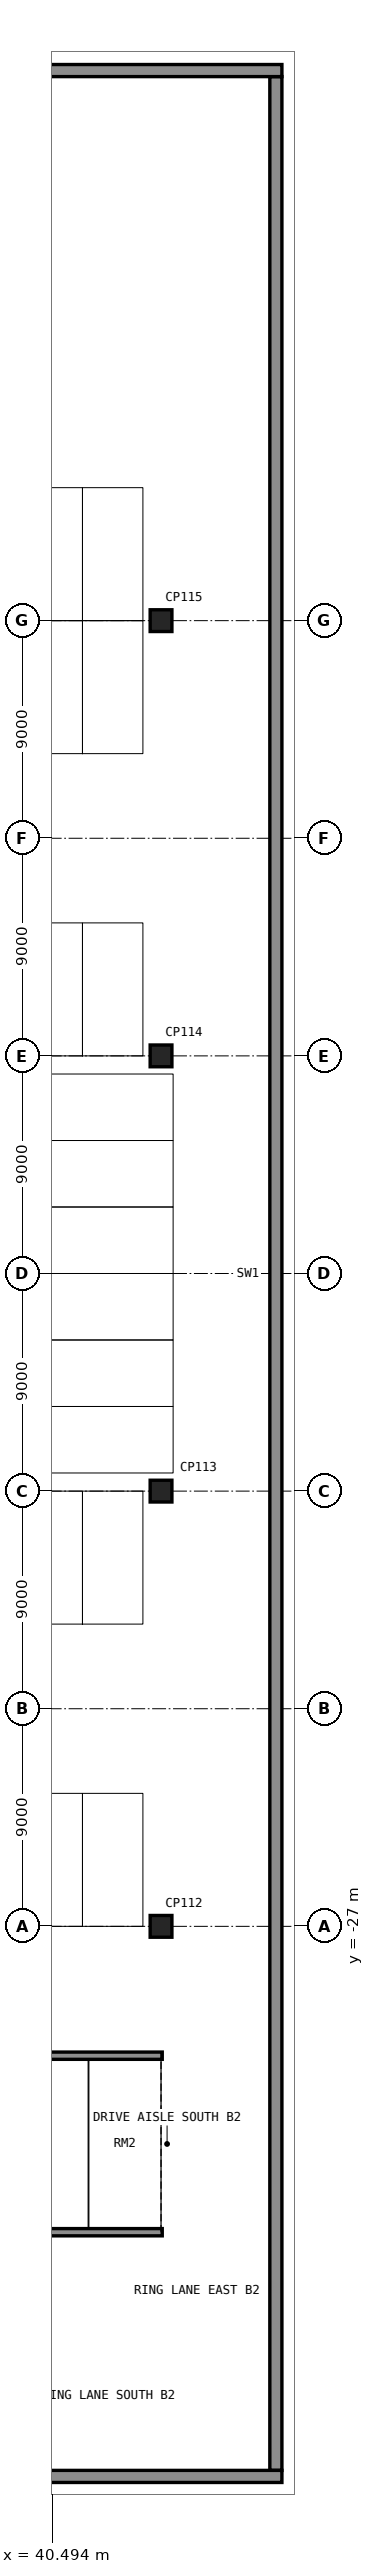
"""IFC4 building model, lengths in metres.
Left out: names, types, materials, properties, quantities, classifications, styles, units other than length and angle.
Written with IfcOpenShell. Run it as: python <this file> out.ifc"""

import sys

from ifc_helpers import new_model, si_unit, direction, frame, frame_2d, origin, origin_2d, place, context, subcontext, project, spatial, rectangle, extrude, element, save


model = new_model("IFC4")
c1 = context("Model", 3, precision=1e-05, world=origin(), true_north=direction((0.0, 1.0)))
c2 = subcontext(c1, "Body", "Model", "MODEL_VIEW")
j1 = project(units=[si_unit("LENGTHUNIT", "METRE"), si_unit("PLANEANGLEUNIT", "RADIAN")], contexts=[c1])
p1 = place(None, origin())
s1 = spatial("IfcSite", under=j1, at=p1, CompositionType="ELEMENT")
p2 = place(p1, origin())
s2 = spatial("IfcBuilding", under=s1, at=p2, CompositionType="ELEMENT")
p3 = place(p2, frame((0.0, 0.0, -8.7)))
s3 = spatial("IfcBuildingStorey", under=s2, at=p3, CompositionType="ELEMENT", Elevation=-8.7)
for number, where, z_axis, x_axis in (
    (1, (-50.0, 49.75, -0.3), (0.0, 0.0, 1.0), (1.0, 0.0, 0.0)),
    (2, (-50.0, -49.75, -0.3), (0.0, 0.0, 1.0), (1.0, 0.0, 0.0)),
):
    element("IfcWall", number, at=place(p3, frame(where, z_axis=z_axis, x_axis=x_axis)), inside=s3, PredefinedType="SOLIDWALL", context=c2, shape_type="SweptSolid", body=[
        extrude(rectangle(XDim=100.0, YDim=0.5, at=frame_2d((50.0, 0.0))), origin(), (0.0, 0.0, 1.0), 4.2),
    ])
p4 = place(p3, frame((49.75, -49.5, -0.3), z_axis=(0.0, 0.0, 1.0), x_axis=(0.0, 1.0, 0.0)))
e3 = element("IfcWall", 3, at=p4, inside=s3, PredefinedType="SOLIDWALL", context=c2, shape_type="SweptSolid", body=[
    extrude(rectangle(XDim=99.0, YDim=0.5, at=frame_2d((49.5, 0.0))), origin(), (0.0, 0.0, 1.0), 4.2),
])
for number, where, z_axis, x_axis in (
    (4, (45.0, -27.0, -0.3), (0.0, 0.0, 1.0), (1.0, 0.0, 0.0)),
    (5, (45.0, -9.0, -0.3), (0.0, 0.0, 1.0), (1.0, 0.0, 0.0)),
    (6, (45.0, 9.0, -0.3), (0.0, 0.0, 1.0), (1.0, 0.0, 0.0)),
    (7, (45.0, 27.0, -0.3), (0.0, 0.0, 1.0), (1.0, 0.0, 0.0)),
):
    element("IfcColumn", number, at=place(p3, frame(where, z_axis=z_axis, x_axis=x_axis)), inside=s3, PredefinedType="COLUMN", context=c2, shape_type="SweptSolid", body=[
        extrude(rectangle(XDim=0.9, YDim=0.9, at=origin_2d()), origin(), (0.0, 0.0, 1.0), 4.2),
    ])
for number, where, z_axis, x_axis in (
    (8, (10.5, -39.65, 0.0), (0.0, 0.0, 1.0), (1.0, 0.0, 0.0)),
    (9, (10.5, -32.35, 0.0), (0.0, 0.0, 1.0), (1.0, 0.0, 0.0)),
):
    element("IfcWall", number, at=place(p3, frame(where, z_axis=z_axis, x_axis=x_axis)), inside=s3, PredefinedType="SOLIDWALL", context=c2, shape_type="SweptSolid", body=[
        extrude(rectangle(XDim=34.55, YDim=0.3, at=frame_2d((17.275, 0.0))), origin(), (0.0, 0.0, 1.0), 4.2),
    ])
save(model, sys.argv[1])
